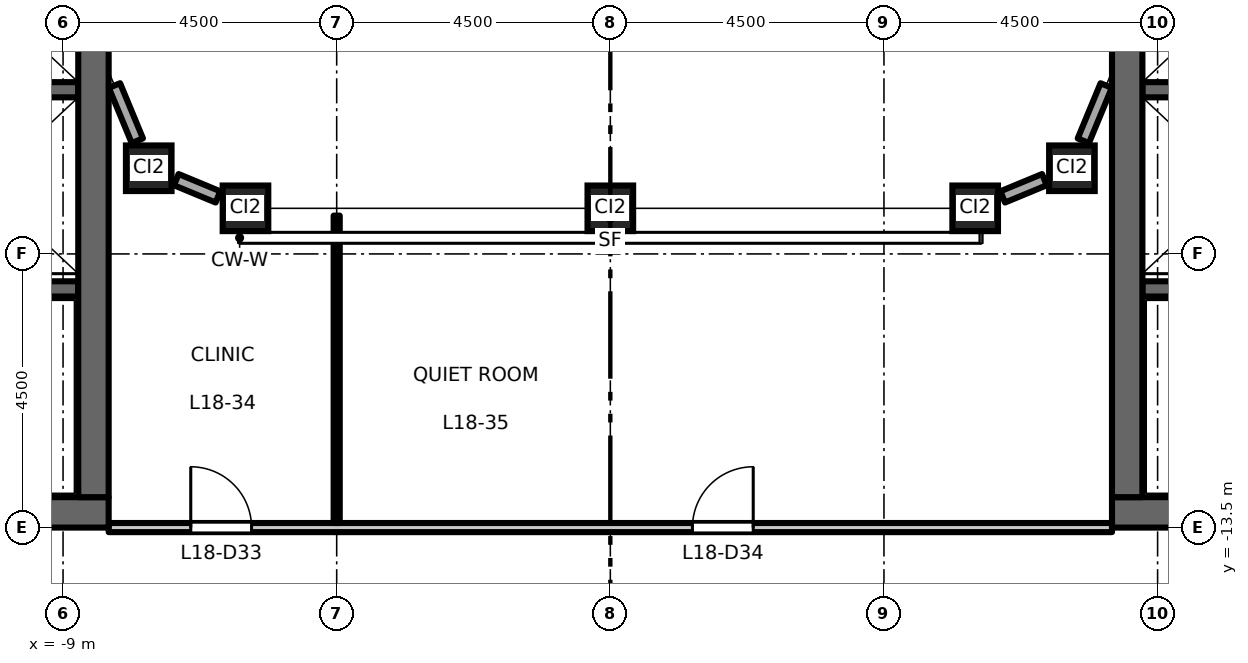
"""IFC4 building model, lengths in metres.
Left out: names, types, materials, properties, quantities, classifications, styles, units other than length and angle.
Written with IfcOpenShell. Run it as: python <this file> out.ifc"""

import sys

from ifc_helpers import new_model, si_unit, direction, frame, frame_2d, origin, origin_2d, place, context, subcontext, project, spatial, rectangle, hollow_rectangle, extrude, element, fill, save


model = new_model("IFC4")
c1 = context("Model", 3, precision=1e-05, world=origin(), true_north=direction((0.0, 1.0)))
c2 = subcontext(c1, "Body", "Model", "MODEL_VIEW")
j1 = project(units=[si_unit("LENGTHUNIT", "METRE"), si_unit("PLANEANGLEUNIT", "RADIAN")], contexts=[c1])
p1 = place(None, origin())
s1 = spatial("IfcSite", under=j1, at=p1, CompositionType="ELEMENT")
p2 = place(p1, origin())
s2 = spatial("IfcBuilding", under=s1, at=p2, CompositionType="ELEMENT")
p3 = place(p2, frame((0.0, 0.0, 85.2)))
s3 = spatial("IfcBuildingStorey", under=s2, at=p3, CompositionType="ELEMENT", Elevation=85.2)
for number, where, z_axis, x_axis in (
    (1, (-7.591, -7.591, 0.0), (0.0, 0.0, 1.0), (1.0, 0.0, 0.0)),
    (2, (-6.0, -8.25, 0.0), (0.0, 0.0, 1.0), (1.0, 0.0, 0.0)),
    (3, (0.0, -8.25, 0.0), (0.0, 0.0, 1.0), (1.0, 0.0, 0.0)),
    (4, (6.0, -8.25, 0.0), (0.0, 0.0, 1.0), (1.0, 0.0, 0.0)),
    (5, (7.591, -7.591, 0.0), (0.0, 0.0, 1.0), (1.0, 0.0, 0.0)),
):
    element("IfcColumn", number, at=place(p3, frame(where, z_axis=z_axis, x_axis=x_axis)), inside=s3, PredefinedType="COLUMN", context=c2, shape_type="SweptSolid", body=[
        extrude(hollow_rectangle(XDim=0.75, YDim=0.75, WallThickness=0.045, at=origin_2d()), origin(), (0.0, 0.0, 1.0), 4.5),
    ])
p4 = place(p3, frame((-8.75, -6.3, 0.0), z_axis=(0.0, 0.0, 1.0), x_axis=(-1.0, 0.0, 0.0)))
e6 = element("IfcWall", 6, at=p4, inside=s3, PredefinedType="SHEAR", context=c2, shape_type="SweptSolid", body=[
    extrude(rectangle(XDim=3.1, YDim=0.25, at=frame_2d((1.55, 0.0))), origin(), (0.0, 0.0, 1.0), 4.35),
])
p5 = place(p3, frame((-8.75, -9.575, 0.0), z_axis=(0.0, 0.0, 1.0), x_axis=(-1.0, 0.0, 0.0)))
e7 = element("IfcWall", 7, at=p5, inside=s3, PredefinedType="SHEAR", context=c2, shape_type="SweptSolid", body=[
    extrude(rectangle(XDim=8.0, YDim=0.25, at=frame_2d((4.0, 0.0))), origin(), (0.0, 0.0, 1.0), 4.35),
])
p6 = place(p5, frame((6.65, 0.0, 0.0)))
e8 = element("IfcOpeningElement", 8, at=p6, cuts=e7, PredefinedType="OPENING", context=c2, shape_type="SweptSolid", body=[
    extrude(rectangle(XDim=1.1, YDim=2.1, at=frame_2d((0.55, 1.05))), frame((0.0, 0.135, 0.0), z_axis=(0.0, -1.0, 0.0), x_axis=(1.0, 0.0, 0.0)), (0.0, 0.0, 1.0), 0.27),
])
p7 = place(p3, frame((-8.25, -13.25, 0.0), z_axis=(0.0, 0.0, 1.0), x_axis=(-1.0, 0.0, 0.0)))
e9 = element("IfcWall", 9, at=p7, inside=s3, PredefinedType="SHEAR", context=c2, shape_type="SweptSolid", body=[
    extrude(rectangle(XDim=13.5, YDim=0.5, at=frame_2d((6.75, 0.0))), origin(), (0.0, 0.0, 1.0), 4.35),
])
p8 = place(p3, frame((-8.5, -13.0, 0.0), z_axis=(0.0, 0.0, 1.0), x_axis=(0.0, 1.0, 0.0)))
e10 = element("IfcWall", 10, at=p8, inside=s3, PredefinedType="SHEAR", context=c2, shape_type="SweptSolid", body=[
    extrude(rectangle(XDim=26.0, YDim=0.5, at=frame_2d((13.0, 0.0))), origin(), (0.0, 0.0, 1.0), 4.35),
])
p9 = place(p3, frame((8.75, -6.3, 0.0), z_axis=(0.0, 0.0, 1.0), x_axis=(1.0, 0.0, 0.0)))
e11 = element("IfcWall", 11, at=p9, inside=s3, PredefinedType="SHEAR", context=c2, shape_type="SweptSolid", body=[
    extrude(rectangle(XDim=3.1, YDim=0.25, at=frame_2d((1.55, 0.0))), origin(), (0.0, 0.0, 1.0), 4.35),
])
p10 = place(p3, frame((8.75, -9.575, 0.0), z_axis=(0.0, 0.0, 1.0), x_axis=(1.0, 0.0, 0.0)))
e12 = element("IfcWall", 12, at=p10, inside=s3, PredefinedType="SHEAR", context=c2, shape_type="SweptSolid", body=[
    extrude(rectangle(XDim=8.0, YDim=0.25, at=frame_2d((4.0, 0.0))), origin(), (0.0, 0.0, 1.0), 4.35),
])
p11 = place(p10, frame((6.65, 0.0, 0.0)))
e13 = element("IfcOpeningElement", 13, at=p11, cuts=e12, PredefinedType="OPENING", context=c2, shape_type="SweptSolid", body=[
    extrude(rectangle(XDim=1.1, YDim=2.1, at=frame_2d((0.55, 1.05))), frame((0.0, 0.135, 0.0), z_axis=(0.0, -1.0, 0.0), x_axis=(1.0, 0.0, 0.0)), (0.0, 0.0, 1.0), 0.27),
])
p12 = place(p3, frame((8.25, -13.25, 0.0), z_axis=(0.0, 0.0, 1.0), x_axis=(1.0, 0.0, 0.0)))
e14 = element("IfcWall", 14, at=p12, inside=s3, PredefinedType="SHEAR", context=c2, shape_type="SweptSolid", body=[
    extrude(rectangle(XDim=13.5, YDim=0.5, at=frame_2d((6.75, 0.0))), origin(), (0.0, 0.0, 1.0), 4.35),
])
p13 = place(p3, frame((8.5, -13.0, 0.0), z_axis=(0.0, 0.0, 1.0), x_axis=(0.0, 1.0, 0.0)))
e15 = element("IfcWall", 15, at=p13, inside=s3, PredefinedType="SHEAR", context=c2, shape_type="SweptSolid", body=[
    extrude(rectangle(XDim=26.0, YDim=0.5, at=frame_2d((13.0, 0.0))), origin(), (0.0, 0.0, 1.0), 4.35),
])
p14 = place(p3, frame((6.453, -8.062, 0.0), z_axis=(0.0, 0.0, 1.0), x_axis=(0.923940677943, 0.382535780864, 0.0)))
e16 = element("IfcWall", 16, at=p14, inside=s3, PredefinedType="STANDARD", context=c2, shape_type="SweptSolid", body=[
    extrude(rectangle(XDim=0.742, YDim=0.2, at=frame_2d((0.371, 0.0))), origin(), (0.0, 0.0, 1.0), 3.73),
])
for number, where, z_axis, x_axis in (
    (17, (7.779, -7.138, 0.0), (0.0, 0.0, 1.0), (0.383, 0.924, 0.0)),
    (18, (-8.154, -6.231, 0.0), (0.0, 0.0, 1.0), (0.383, -0.924, 0.0)),
):
    element("IfcWall", number, at=place(p3, frame(where, z_axis=z_axis, x_axis=x_axis)), inside=s3, PredefinedType="STANDARD", context=c2, shape_type="SweptSolid", body=[
        extrude(rectangle(XDim=0.982, YDim=0.2, at=frame_2d((0.491, 0.0))), origin(), (0.0, 0.0, 1.0), 3.73),
    ])
p15 = place(p3, frame((-7.138, -7.779, 0.0), z_axis=(0.0, 0.0, 1.0), x_axis=(0.923940677943, -0.382535780864, 0.0)))
e19 = element("IfcWall", 19, at=p15, inside=s3, PredefinedType="STANDARD", context=c2, shape_type="SweptSolid", body=[
    extrude(rectangle(XDim=0.742, YDim=0.2, at=frame_2d((0.371, 0.0))), origin(), (0.0, 0.0, 1.0), 3.73),
])
p16 = place(p3, frame((-8.25, -13.5, 0.0), z_axis=(0.0, 0.0, 1.0), x_axis=(1.0, 0.0, 0.0)))
e20 = element("IfcWall", 20, at=p16, inside=s3, PredefinedType="PARTITIONING", context=c2, shape_type="SweptSolid", body=[
    extrude(rectangle(XDim=16.5, YDim=0.15, at=frame_2d((8.25, 0.0))), origin(), (0.0, 0.0, 1.0), 3.85),
])
p17 = place(p16, frame((1.35, 0.0, 0.0)))
e21 = element("IfcOpeningElement", 21, at=p17, cuts=e20, PredefinedType="OPENING", context=c2, shape_type="SweptSolid", body=[
    extrude(rectangle(XDim=1.0, YDim=2.1, at=frame_2d((0.5, 1.05))), frame((0.0, 0.085, 0.0), z_axis=(0.0, -1.0, 0.0), x_axis=(1.0, 0.0, 0.0)), (0.0, 0.0, 1.0), 0.17),
])
p18 = place(p16, frame((9.6, 0.0, 0.0)))
e22 = element("IfcOpeningElement", 22, at=p18, cuts=e20, PredefinedType="OPENING", context=c2, shape_type="SweptSolid", body=[
    extrude(rectangle(XDim=1.0, YDim=2.1, at=frame_2d((0.5, 1.05))), frame((0.0, 0.085, 0.0), z_axis=(0.0, -1.0, 0.0), x_axis=(1.0, 0.0, 0.0)), (0.0, 0.0, 1.0), 0.17),
])
p19 = place(p3, frame((-4.5, -13.425, 0.0), z_axis=(0.0, 0.0, 1.0), x_axis=(0.0, 1.0, 0.0)))
e23 = element("IfcWall", 23, at=p19, inside=s3, PredefinedType="PARTITIONING", context=c2, shape_type="SweptSolid", body=[
    extrude(rectangle(XDim=5.055, YDim=0.1, at=frame_2d((2.527, 0.0))), origin(), (0.0, 0.0, 1.0), 3.35),
])
p20 = place(p17, origin())
e24 = element("IfcDoor", 24, at=p20, inside=s3, OperationType="SINGLE_SWING_LEFT", PredefinedType="DOOR", context=c2, shape_type="SweptSolid", body=[
    extrude(rectangle(XDim=1.0, YDim=2.1, at=frame_2d((0.5, 1.05))), frame((0.0, 0.025, 0.0), z_axis=(0.0, -1.0, 0.0), x_axis=(1.0, 0.0, 0.0)), (0.0, 0.0, 1.0), 0.05),
])
fill(e21, e24)
p21 = place(p18, origin())
e25 = element("IfcDoor", 25, at=p21, inside=s3, OperationType="SINGLE_SWING_RIGHT", PredefinedType="DOOR", context=c2, shape_type="SweptSolid", body=[
    extrude(rectangle(XDim=1.0, YDim=2.1, at=frame_2d((0.5, 1.05))), frame((0.0, 0.025, 0.0), z_axis=(0.0, -1.0, 0.0), x_axis=(1.0, 0.0, 0.0)), (0.0, 0.0, 1.0), 0.05),
])
fill(e22, e25)
save(model, sys.argv[1])
